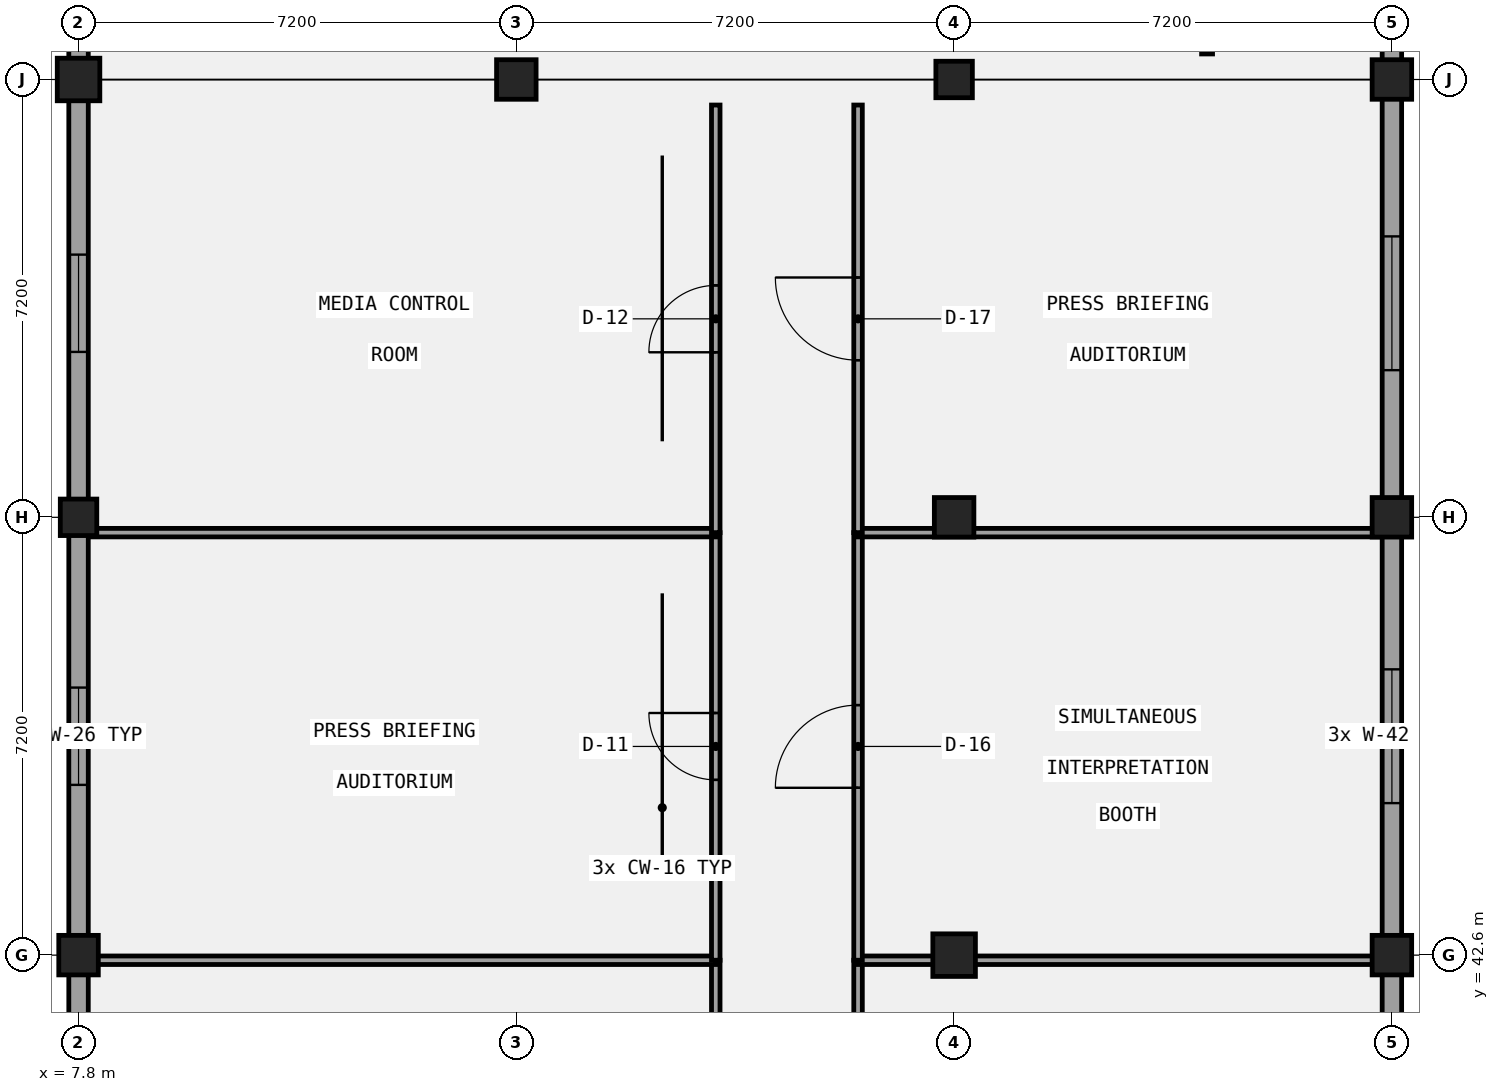
"""IFC4 building model, lengths in metres.
Left out: names, types, materials, properties, quantities, classifications, styles, units other than length and angle.
Written with IfcOpenShell. Run it as: python <this file> out.ifc"""

import sys

from ifc_helpers import new_model, si_unit, direction, frame, frame_2d, origin, origin_2d, place, context, subcontext, project, spatial, rectangle, circle, extrude, element, fill, save


model = new_model("IFC4")
c1 = context("Model", 3, precision=1e-05, world=origin(), true_north=direction((0.0, 1.0)))
c2 = subcontext(c1, "Body", "Model", "MODEL_VIEW")
j1 = project(units=[si_unit("LENGTHUNIT", "METRE"), si_unit("PLANEANGLEUNIT", "RADIAN")], contexts=[c1])
p1 = place(None, origin())
s1 = spatial("IfcSite", under=j1, at=p1, CompositionType="ELEMENT")
p2 = place(p1, origin())
s2 = spatial("IfcBuilding", under=s1, at=p2, CompositionType="ELEMENT")
p3 = place(p2, frame((0.0, 0.0, 9.6)))
s3 = spatial("IfcBuildingStorey", under=s2, at=p3, CompositionType="ELEMENT", Elevation=9.6)
p4 = place(p3, frame((7.8, 42.6, 0.0), z_axis=(0.0, 0.0, 1.0), x_axis=(1.0, 0.0, 0.0)))
e1 = element("IfcColumn", 1, at=p4, inside=s3, PredefinedType="COLUMN", context=c2, shape_type="SweptSolid", body=[
    extrude(rectangle(XDim=0.65, YDim=0.65, at=origin_2d()), origin(), (0.0, 0.0, 1.0), 4.2),
])
p5 = place(p3, frame((7.8, 49.8, 0.0), z_axis=(0.0, 0.0, 1.0), x_axis=(1.0, 0.0, 0.0)))
e2 = element("IfcColumn", 2, at=p5, inside=s3, PredefinedType="COLUMN", context=c2, shape_type="SweptSolid", body=[
    extrude(rectangle(XDim=0.6, YDim=0.6, at=origin_2d()), origin(), (0.0, 0.0, 1.0), 4.2),
])
p6 = place(p3, frame((7.8, 57.0, 0.0), z_axis=(0.0, 0.0, 1.0), x_axis=(1.0, 0.0, 0.0)))
e3 = element("IfcColumn", 3, at=p6, inside=s3, PredefinedType="COLUMN", context=c2, shape_type="SweptSolid", body=[
    extrude(rectangle(XDim=0.7, YDim=0.7, at=origin_2d()), origin(), (0.0, 0.0, 1.0), 4.2),
])
p7 = place(p3, frame((15.0, 57.0, 0.0), z_axis=(0.0, 0.0, 1.0), x_axis=(1.0, 0.0, 0.0)))
e4 = element("IfcColumn", 4, at=p7, inside=s3, PredefinedType="COLUMN", context=c2, shape_type="SweptSolid", body=[
    extrude(rectangle(XDim=0.65, YDim=0.65, at=origin_2d()), origin(), (0.0, 0.0, 1.0), 4.2),
])
p8 = place(p3, frame((22.2, 42.6, 0.0), z_axis=(0.0, 0.0, 1.0), x_axis=(1.0, 0.0, 0.0)))
e5 = element("IfcColumn", 5, at=p8, inside=s3, PredefinedType="COLUMN", context=c2, shape_type="SweptSolid", body=[
    extrude(rectangle(XDim=0.7, YDim=0.7, at=origin_2d()), origin(), (0.0, 0.0, 1.0), 4.2),
])
p9 = place(p3, frame((22.2, 49.8, 0.0), z_axis=(0.0, 0.0, 1.0), x_axis=(1.0, 0.0, 0.0)))
e6 = element("IfcColumn", 6, at=p9, inside=s3, PredefinedType="COLUMN", context=c2, shape_type="SweptSolid", body=[
    extrude(rectangle(XDim=0.65, YDim=0.65, at=origin_2d()), origin(), (0.0, 0.0, 1.0), 4.2),
])
p10 = place(p3, frame((22.2, 57.0, 0.0), z_axis=(0.0, 0.0, 1.0), x_axis=(1.0, 0.0, 0.0)))
e7 = element("IfcColumn", 7, at=p10, inside=s3, PredefinedType="COLUMN", context=c2, shape_type="SweptSolid", body=[
    extrude(rectangle(XDim=0.6, YDim=0.6, at=origin_2d()), origin(), (0.0, 0.0, 1.0), 4.2),
])
for number, where, z_axis, x_axis in (
    (8, (29.4, 42.6, 0.0), (0.0, 0.0, 1.0), (1.0, 0.0, 0.0)),
    (9, (29.4, 49.8, 0.0), (0.0, 0.0, 1.0), (1.0, 0.0, 0.0)),
    (10, (29.4, 57.0, 0.0), (0.0, 0.0, 1.0), (1.0, 0.0, 0.0)),
):
    element("IfcColumn", number, at=place(p3, frame(where, z_axis=z_axis, x_axis=x_axis)), inside=s3, PredefinedType="COLUMN", context=c2, shape_type="SweptSolid", body=[
        extrude(circle(Radius=0.325, at=origin_2d()), origin(), (0.0, 0.0, 1.0), 4.2),
    ])
p11 = place(p3, frame((7.8, 64.01, 0.0), z_axis=(0.0, 0.0, 1.0), x_axis=(0.0, -1.0, 0.0)))
e11 = element("IfcWall", 11, at=p11, inside=s3, PredefinedType="SOLIDWALL", context=c2, shape_type="SweptSolid", body=[
    extrude(rectangle(XDim=6.85, YDim=0.32, at=frame_2d((3.425, 0.0))), origin(), (0.0, 0.0, 1.0), 3.04),
])
p12 = place(p11, frame((2.7, 0.0, 1.0)))
e12 = element("IfcOpeningElement", 12, at=p12, cuts=e11, PredefinedType="OPENING", context=c2, shape_type="SweptSolid", body=[
    extrude(rectangle(XDim=1.45, YDim=1.65, at=frame_2d((0.725, 0.825))), frame((0.0, 0.17, 0.0), z_axis=(0.0, -1.0, 0.0), x_axis=(1.0, 0.0, 0.0)), (0.0, 0.0, 1.0), 0.34),
])
p13 = place(p3, frame((7.8, 56.84, 0.0), z_axis=(0.0, 0.0, 1.0), x_axis=(0.0, -1.0, 0.0)))
e13 = element("IfcWall", 13, at=p13, inside=s3, PredefinedType="SOLIDWALL", context=c2, shape_type="SweptSolid", body=[
    extrude(rectangle(XDim=35.68, YDim=0.32, at=frame_2d((17.84, 0.0))), origin(), (0.0, 0.0, 1.0), 3.09),
])
p14 = place(p13, frame((31.36, 0.0, 1.0)))
e14 = element("IfcOpeningElement", 14, at=p14, cuts=e13, PredefinedType="OPENING", context=c2, shape_type="SweptSolid", body=[
    extrude(rectangle(XDim=1.6, YDim=1.4, at=frame_2d((0.8, 0.7))), frame((0.0, 0.17, 0.0), z_axis=(0.0, -1.0, 0.0), x_axis=(1.0, 0.0, 0.0)), (0.0, 0.0, 1.0), 0.34),
])
p15 = place(p13, frame((24.24, 0.0, 1.0)))
e15 = element("IfcOpeningElement", 15, at=p15, cuts=e13, PredefinedType="OPENING", context=c2, shape_type="SweptSolid", body=[
    extrude(rectangle(XDim=1.6, YDim=1.4, at=frame_2d((0.8, 0.7))), frame((0.0, 0.17, 0.0), z_axis=(0.0, -1.0, 0.0), x_axis=(1.0, 0.0, 0.0)), (0.0, 0.0, 1.0), 0.34),
])
p16 = place(p13, frame((17.04, 0.0, 1.0)))
e16 = element("IfcOpeningElement", 16, at=p16, cuts=e13, PredefinedType="OPENING", context=c2, shape_type="SweptSolid", body=[
    extrude(rectangle(XDim=1.6, YDim=1.4, at=frame_2d((0.8, 0.7))), frame((0.0, 0.17, 0.0), z_axis=(0.0, -1.0, 0.0), x_axis=(1.0, 0.0, 0.0)), (0.0, 0.0, 1.0), 0.34),
])
p17 = place(p13, frame((9.84, 0.0, 1.0)))
e17 = element("IfcOpeningElement", 17, at=p17, cuts=e13, PredefinedType="OPENING", context=c2, shape_type="SweptSolid", body=[
    extrude(rectangle(XDim=1.6, YDim=1.4, at=frame_2d((0.8, 0.7))), frame((0.0, 0.17, 0.0), z_axis=(0.0, -1.0, 0.0), x_axis=(1.0, 0.0, 0.0)), (0.0, 0.0, 1.0), 0.34),
])
p18 = place(p13, frame((2.72, 0.0, 1.0)))
e18 = element("IfcOpeningElement", 18, at=p18, cuts=e13, PredefinedType="OPENING", context=c2, shape_type="SweptSolid", body=[
    extrude(rectangle(XDim=1.6, YDim=1.4, at=frame_2d((0.8, 0.7))), frame((0.0, 0.17, 0.0), z_axis=(0.0, -1.0, 0.0), x_axis=(1.0, 0.0, 0.0)), (0.0, 0.0, 1.0), 0.34),
])
p19 = place(p3, frame((29.4, 35.56, 0.0), z_axis=(0.0, 0.0, 1.0), x_axis=(0.0, 1.0, 0.0)))
e19 = element("IfcWall", 19, at=p19, inside=s3, PredefinedType="SOLIDWALL", context=c2, shape_type="SweptSolid", body=[
    extrude(rectangle(XDim=21.28, YDim=0.32, at=frame_2d((10.64, 0.0))), origin(), (0.0, 0.0, 1.0), 2.94),
])
p20 = place(p19, frame((2.42, 0.0, 1.0)))
e20 = element("IfcOpeningElement", 20, at=p20, cuts=e19, PredefinedType="OPENING", context=c2, shape_type="SweptSolid", body=[
    extrude(rectangle(XDim=2.2, YDim=1.65, at=frame_2d((1.1, 0.825))), frame((0.0, 0.17, 0.0), z_axis=(0.0, -1.0, 0.0), x_axis=(1.0, 0.0, 0.0)), (0.0, 0.0, 1.0), 0.34),
])
p21 = place(p19, frame((9.54, 0.0, 1.0)))
e21 = element("IfcOpeningElement", 21, at=p21, cuts=e19, PredefinedType="OPENING", context=c2, shape_type="SweptSolid", body=[
    extrude(rectangle(XDim=2.2, YDim=1.65, at=frame_2d((1.1, 0.825))), frame((0.0, 0.17, 0.0), z_axis=(0.0, -1.0, 0.0), x_axis=(1.0, 0.0, 0.0)), (0.0, 0.0, 1.0), 0.34),
])
p22 = place(p19, frame((16.66, 0.0, 1.0)))
e22 = element("IfcOpeningElement", 22, at=p22, cuts=e19, PredefinedType="OPENING", context=c2, shape_type="SweptSolid", body=[
    extrude(rectangle(XDim=2.2, YDim=1.65, at=frame_2d((1.1, 0.825))), frame((0.0, 0.17, 0.0), z_axis=(0.0, -1.0, 0.0), x_axis=(1.0, 0.0, 0.0)), (0.0, 0.0, 1.0), 0.34),
])
p23 = place(p3, frame((29.4, 57.16, 0.0), z_axis=(0.0, 0.0, 1.0), x_axis=(0.0, 1.0, 0.0)))
e23 = element("IfcWall", 23, at=p23, inside=s3, PredefinedType="SOLIDWALL", context=c2, shape_type="SweptSolid", body=[
    extrude(rectangle(XDim=21.28, YDim=0.32, at=frame_2d((10.64, 0.0))), origin(), (0.0, 0.0, 1.0), 3.19),
])
p24 = place(p23, frame((2.62, 0.0, 1.0)))
e24 = element("IfcOpeningElement", 24, at=p24, cuts=e23, PredefinedType="OPENING", context=c2, shape_type="SweptSolid", body=[
    extrude(rectangle(XDim=1.8, YDim=1.4, at=frame_2d((0.9, 0.7))), frame((0.0, 0.17, 0.0), z_axis=(0.0, -1.0, 0.0), x_axis=(1.0, 0.0, 0.0)), (0.0, 0.0, 1.0), 0.34),
])
p25 = place(p23, frame((9.74, 0.0, 1.0)))
e25 = element("IfcOpeningElement", 25, at=p25, cuts=e23, PredefinedType="OPENING", context=c2, shape_type="SweptSolid", body=[
    extrude(rectangle(XDim=1.8, YDim=1.4, at=frame_2d((0.9, 0.7))), frame((0.0, 0.17, 0.0), z_axis=(0.0, -1.0, 0.0), x_axis=(1.0, 0.0, 0.0)), (0.0, 0.0, 1.0), 0.34),
])
p26 = place(p23, frame((16.86, 0.0, 1.0)))
e26 = element("IfcOpeningElement", 26, at=p26, cuts=e23, PredefinedType="OPENING", context=c2, shape_type="SweptSolid", body=[
    extrude(rectangle(XDim=1.8, YDim=1.4, at=frame_2d((0.9, 0.7))), frame((0.0, 0.17, 0.0), z_axis=(0.0, -1.0, 0.0), x_axis=(1.0, 0.0, 0.0)), (0.0, 0.0, 1.0), 0.34),
])
p27 = place(p3, frame((18.28, 35.484, 0.0), z_axis=(0.0, 0.0, 1.0), x_axis=(0.0, 1.0, 0.0)))
e27 = element("IfcWall", 27, at=p27, inside=s3, PredefinedType="PARTITIONING", context=c2, shape_type="SweptSolid", body=[
    extrude(rectangle(XDim=7.032, YDim=0.14, at=frame_2d((3.516, 0.0))), origin(), (0.0, 0.0, 1.0), 3.94),
])
p28 = place(p27, frame((2.966, 0.0, 0.0)))
e28 = element("IfcOpeningElement", 28, at=p28, cuts=e27, PredefinedType="OPENING", context=c2, shape_type="SweptSolid", body=[
    extrude(rectangle(XDim=1.1, YDim=2.1, at=frame_2d((0.55, 1.05))), frame((0.0, 0.08, 0.0), z_axis=(0.0, -1.0, 0.0), x_axis=(1.0, 0.0, 0.0)), (0.0, 0.0, 1.0), 0.16),
])
p29 = place(p3, frame((7.98, 42.516, 0.0), z_axis=(0.0, 0.0, 1.0), x_axis=(1.0, 0.0, 0.0)))
e29 = element("IfcWall", 29, at=p29, inside=s3, PredefinedType="PARTITIONING", context=c2, shape_type="SweptSolid", body=[
    extrude(rectangle(XDim=10.3, YDim=0.14, at=frame_2d((5.15, 0.0))), origin(), (0.0, 0.0, 1.0), 2.74),
])
p30 = place(p3, frame((18.28, 42.516, 0.0), z_axis=(0.0, 0.0, 1.0), x_axis=(0.0, 1.0, 0.0)))
e30 = element("IfcWall", 30, at=p30, inside=s3, PredefinedType="PARTITIONING", context=c2, shape_type="SweptSolid", body=[
    extrude(rectangle(XDim=7.032, YDim=0.14, at=frame_2d((3.516, 0.0))), origin(), (0.0, 0.0, 1.0), 3.94),
])
p31 = place(p30, frame((2.966, 0.0, 0.0)))
e31 = element("IfcOpeningElement", 31, at=p31, cuts=e30, PredefinedType="OPENING", context=c2, shape_type="SweptSolid", body=[
    extrude(rectangle(XDim=1.1, YDim=2.22, at=frame_2d((0.55, 1.11))), frame((0.0, 0.08, 0.0), z_axis=(0.0, -1.0, 0.0), x_axis=(1.0, 0.0, 0.0)), (0.0, 0.0, 1.0), 0.16),
])
p32 = place(p3, frame((7.98, 49.548, 0.0), z_axis=(0.0, 0.0, 1.0), x_axis=(1.0, 0.0, 0.0)))
e32 = element("IfcWall", 32, at=p32, inside=s3, PredefinedType="PARTITIONING", context=c2, shape_type="SweptSolid", body=[
    extrude(rectangle(XDim=10.3, YDim=0.14, at=frame_2d((5.15, 0.0))), origin(), (0.0, 0.0, 1.0), 2.74),
])
p33 = place(p3, frame((18.28, 49.548, 0.0), z_axis=(0.0, 0.0, 1.0), x_axis=(0.0, 1.0, 0.0)))
e33 = element("IfcWall", 33, at=p33, inside=s3, PredefinedType="PARTITIONING", context=c2, shape_type="SweptSolid", body=[
    extrude(rectangle(XDim=7.032, YDim=0.14, at=frame_2d((3.516, 0.0))), origin(), (0.0, 0.0, 1.0), 3.94),
])
p34 = place(p33, frame((2.966, 0.0, 0.0)))
e34 = element("IfcOpeningElement", 34, at=p34, cuts=e33, PredefinedType="OPENING", context=c2, shape_type="SweptSolid", body=[
    extrude(rectangle(XDim=1.1, YDim=2.35, at=frame_2d((0.55, 1.175))), frame((0.0, 0.08, 0.0), z_axis=(0.0, -1.0, 0.0), x_axis=(1.0, 0.0, 0.0)), (0.0, 0.0, 1.0), 0.16),
])
p35 = place(p3, frame((20.62, 35.484, 0.0), z_axis=(0.0, 0.0, 1.0), x_axis=(0.0, 1.0, 0.0)))
e35 = element("IfcWall", 35, at=p35, inside=s3, PredefinedType="PARTITIONING", context=c2, shape_type="SweptSolid", body=[
    extrude(rectangle(XDim=7.032, YDim=0.14, at=frame_2d((3.516, 0.0))), origin(), (0.0, 0.0, 1.0), 3.94),
])
p36 = place(p35, frame((2.906, 0.0, 0.0)))
e36 = element("IfcOpeningElement", 36, at=p36, cuts=e35, PredefinedType="OPENING", context=c2, shape_type="SweptSolid", body=[
    extrude(rectangle(XDim=1.22, YDim=2.35, at=frame_2d((0.61, 1.175))), frame((0.0, 0.08, 0.0), z_axis=(0.0, -1.0, 0.0), x_axis=(1.0, 0.0, 0.0)), (0.0, 0.0, 1.0), 0.16),
])
p37 = place(p3, frame((20.62, 42.516, 0.0), z_axis=(0.0, 0.0, 1.0), x_axis=(1.0, 0.0, 0.0)))
e37 = element("IfcWall", 37, at=p37, inside=s3, PredefinedType="PARTITIONING", context=c2, shape_type="SweptSolid", body=[
    extrude(rectangle(XDim=8.6, YDim=0.14, at=frame_2d((4.3, 0.0))), origin(), (0.0, 0.0, 1.0), 2.74),
])
p38 = place(p3, frame((20.62, 42.516, 0.0), z_axis=(0.0, 0.0, 1.0), x_axis=(0.0, 1.0, 0.0)))
e38 = element("IfcWall", 38, at=p38, inside=s3, PredefinedType="PARTITIONING", context=c2, shape_type="SweptSolid", body=[
    extrude(rectangle(XDim=7.032, YDim=0.14, at=frame_2d((3.516, 0.0))), origin(), (0.0, 0.0, 1.0), 3.94),
])
p39 = place(p38, frame((2.836, 0.0, 0.0)))
e39 = element("IfcOpeningElement", 39, at=p39, cuts=e38, PredefinedType="OPENING", context=c2, shape_type="SweptSolid", body=[
    extrude(rectangle(XDim=1.36, YDim=2.1, at=frame_2d((0.68, 1.05))), frame((0.0, 0.08, 0.0), z_axis=(0.0, -1.0, 0.0), x_axis=(1.0, 0.0, 0.0)), (0.0, 0.0, 1.0), 0.16),
])
p40 = place(p3, frame((20.62, 49.548, 0.0), z_axis=(0.0, 0.0, 1.0), x_axis=(1.0, 0.0, 0.0)))
e40 = element("IfcWall", 40, at=p40, inside=s3, PredefinedType="PARTITIONING", context=c2, shape_type="SweptSolid", body=[
    extrude(rectangle(XDim=8.6, YDim=0.14, at=frame_2d((4.3, 0.0))), origin(), (0.0, 0.0, 1.0), 2.74),
])
p41 = place(p3, frame((20.62, 49.548, 0.0), z_axis=(0.0, 0.0, 1.0), x_axis=(0.0, 1.0, 0.0)))
e41 = element("IfcWall", 41, at=p41, inside=s3, PredefinedType="PARTITIONING", context=c2, shape_type="SweptSolid", body=[
    extrude(rectangle(XDim=7.032, YDim=0.14, at=frame_2d((3.516, 0.0))), origin(), (0.0, 0.0, 1.0), 3.94),
])
p42 = place(p41, frame((2.836, 0.0, 0.0)))
e42 = element("IfcOpeningElement", 42, at=p42, cuts=e41, PredefinedType="OPENING", context=c2, shape_type="SweptSolid", body=[
    extrude(rectangle(XDim=1.36, YDim=2.22, at=frame_2d((0.68, 1.11))), frame((0.0, 0.08, 0.0), z_axis=(0.0, -1.0, 0.0), x_axis=(1.0, 0.0, 0.0)), (0.0, 0.0, 1.0), 0.16),
])
p43 = place(p3, frame((26.36, 57.42, 0.0), z_axis=(0.0, 0.0, 1.0), x_axis=(0.0, 1.0, 0.0)))
e43 = element("IfcWall", 43, at=p43, inside=s3, PredefinedType="PARTITIONING", context=c2, shape_type="SweptSolid", body=[
    extrude(rectangle(XDim=7.315, YDim=0.18, at=frame_2d((3.658, 0.0))), origin(), (0.0, 0.0, 1.0), 3.94),
])
p44 = place(p43, frame((2.897, 0.0, 0.0)))
e44 = element("IfcOpeningElement", 44, at=p44, cuts=e43, PredefinedType="OPENING", context=c2, shape_type="SweptSolid", body=[
    extrude(rectangle(XDim=1.52, YDim=2.22, at=frame_2d((0.76, 1.11))), frame((0.0, 0.1, 0.0), z_axis=(0.0, -1.0, 0.0), x_axis=(1.0, 0.0, 0.0)), (0.0, 0.0, 1.0), 0.2),
])
p45 = place(p17, origin())
e45 = element("IfcWindow", 45, at=p45, inside=s3, PartitioningType="SINGLE_PANEL", PredefinedType="WINDOW", context=c2, shape_type="SweptSolid", body=[
    extrude(rectangle(XDim=1.6, YDim=1.4, at=frame_2d((0.8, 0.7))), frame((0.0, 0.03, 0.0), z_axis=(0.0, -1.0, 0.0), x_axis=(1.0, 0.0, 0.0)), (0.0, 0.0, 1.0), 0.06),
])
fill(e17, e45)
p46 = place(p18, origin())
e46 = element("IfcWindow", 46, at=p46, inside=s3, PartitioningType="SINGLE_PANEL", PredefinedType="WINDOW", context=c2, shape_type="SweptSolid", body=[
    extrude(rectangle(XDim=1.6, YDim=1.4, at=frame_2d((0.8, 0.7))), frame((0.0, 0.03, 0.0), z_axis=(0.0, -1.0, 0.0), x_axis=(1.0, 0.0, 0.0)), (0.0, 0.0, 1.0), 0.06),
])
fill(e18, e46)
p47 = place(p21, origin())
e47 = element("IfcWindow", 47, at=p47, inside=s3, PartitioningType="SINGLE_PANEL", PredefinedType="WINDOW", context=c2, shape_type="SweptSolid", body=[
    extrude(rectangle(XDim=2.2, YDim=1.65, at=frame_2d((1.1, 0.825))), frame((0.0, 0.03, 0.0), z_axis=(0.0, -1.0, 0.0), x_axis=(1.0, 0.0, 0.0)), (0.0, 0.0, 1.0), 0.06),
])
fill(e21, e47)
p48 = place(p22, origin())
e48 = element("IfcWindow", 48, at=p48, inside=s3, PartitioningType="SINGLE_PANEL", PredefinedType="WINDOW", context=c2, shape_type="SweptSolid", body=[
    extrude(rectangle(XDim=2.2, YDim=1.65, at=frame_2d((1.1, 0.825))), frame((0.0, 0.03, 0.0), z_axis=(0.0, -1.0, 0.0), x_axis=(1.0, 0.0, 0.0)), (0.0, 0.0, 1.0), 0.06),
])
fill(e22, e48)
p49 = place(p31, frame((1.1, 0.0, 0.0), z_axis=(0.0, 0.0, 1.0), x_axis=(-1.0, 0.0, 0.0)))
e49 = element("IfcDoor", 49, at=p49, inside=s3, OperationType="SINGLE_SWING_RIGHT", PredefinedType="DOOR", context=c2, shape_type="SweptSolid", body=[
    extrude(rectangle(XDim=1.1, YDim=2.22, at=frame_2d((0.55, 1.11))), frame((0.0, 0.025, 0.0), z_axis=(0.0, -1.0, 0.0), x_axis=(1.0, 0.0, 0.0)), (0.0, 0.0, 1.0), 0.05),
])
fill(e31, e49)
p50 = place(p34, frame((1.1, 0.0, 0.0), z_axis=(0.0, 0.0, 1.0), x_axis=(-1.0, 0.0, 0.0)))
e50 = element("IfcDoor", 50, at=p50, inside=s3, OperationType="SINGLE_SWING_LEFT", PredefinedType="DOOR", context=c2, shape_type="SweptSolid", body=[
    extrude(rectangle(XDim=1.1, YDim=2.35, at=frame_2d((0.55, 1.175))), frame((0.0, 0.025, 0.0), z_axis=(0.0, -1.0, 0.0), x_axis=(1.0, 0.0, 0.0)), (0.0, 0.0, 1.0), 0.05),
])
fill(e34, e50)
p51 = place(p39, origin())
e51 = element("IfcDoor", 51, at=p51, inside=s3, OperationType="SINGLE_SWING_LEFT", PredefinedType="DOOR", context=c2, shape_type="SweptSolid", body=[
    extrude(rectangle(XDim=1.36, YDim=2.1, at=frame_2d((0.68, 1.05))), frame((0.0, 0.025, 0.0), z_axis=(0.0, -1.0, 0.0), x_axis=(1.0, 0.0, 0.0)), (0.0, 0.0, 1.0), 0.05),
])
fill(e39, e51)
p52 = place(p42, origin())
e52 = element("IfcDoor", 52, at=p52, inside=s3, OperationType="SINGLE_SWING_RIGHT", PredefinedType="DOOR", context=c2, shape_type="SweptSolid", body=[
    extrude(rectangle(XDim=1.36, YDim=2.22, at=frame_2d((0.68, 1.11))), frame((0.0, 0.025, 0.0), z_axis=(0.0, -1.0, 0.0), x_axis=(1.0, 0.0, 0.0)), (0.0, 0.0, 1.0), 0.05),
])
fill(e42, e52)
save(model, sys.argv[1])
